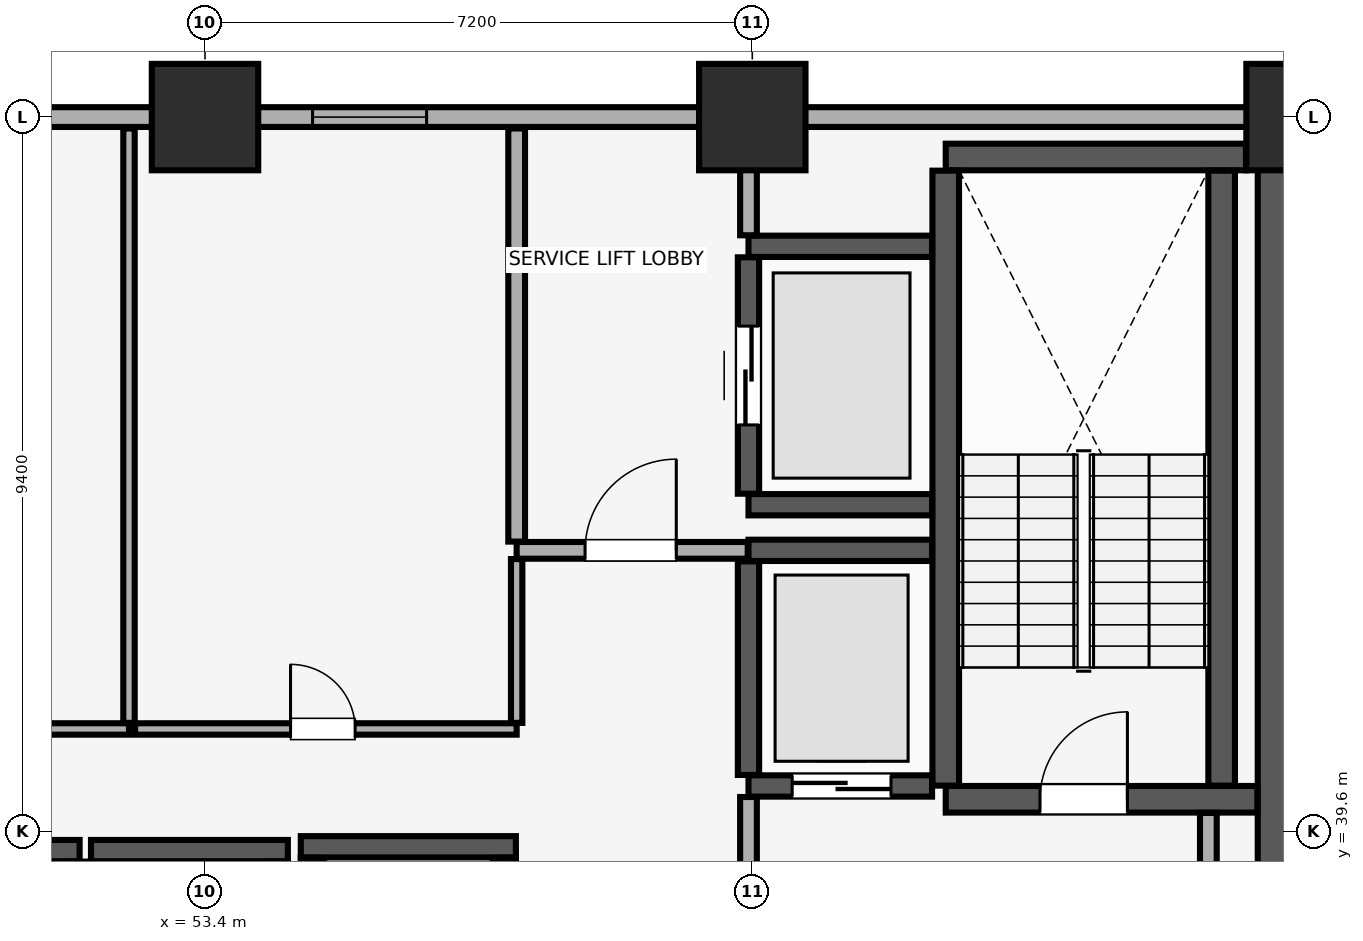
"""IFC4 building model, lengths in metres.
Left out: names, types, materials, properties, quantities, classifications, styles, units other than length and angle.
Written with IfcOpenShell. Run it as: python <this file> out.ifc"""

import sys

from ifc_helpers import new_model, si_unit, direction, frame, frame_2d, origin, origin_2d, place, context, subcontext, project, spatial, rectangle, extrude, element, fill, save


model = new_model("IFC4")
c1 = context("Model", 3, precision=1e-05, world=origin(), true_north=direction((0.0, 1.0)))
c2 = subcontext(c1, "Body", "Model", "MODEL_VIEW")
j1 = project(units=[si_unit("LENGTHUNIT", "METRE"), si_unit("PLANEANGLEUNIT", "RADIAN")], contexts=[c1])
p1 = place(None, origin())
s1 = spatial("IfcSite", under=j1, at=p1, CompositionType="ELEMENT")
p2 = place(p1, origin())
s2 = spatial("IfcBuilding", under=s1, at=p2, CompositionType="ELEMENT")
p3 = place(p2, frame((0.0, 0.0, 35.15)))
s3 = spatial("IfcBuildingStorey", under=s2, at=p3, CompositionType="ELEMENT", Elevation=35.15)
for number, where, z_axis, x_axis in (
    (1, (53.4, 49.0, 0.0), (0.0, 0.0, 1.0), (1.0, 0.0, 0.0)),
    (2, (60.6, 49.0, 0.0), (0.0, 0.0, 1.0), (1.0, 0.0, 0.0)),
    (3, (67.8, 49.0, 0.0), (0.0, 0.0, 1.0), (1.0, 0.0, 0.0)),
):
    element("IfcColumn", number, at=place(p3, frame(where, z_axis=z_axis, x_axis=x_axis)), inside=s3, PredefinedType="COLUMN", context=c2, shape_type="SweptSolid", body=[
        extrude(rectangle(XDim=1.4, YDim=1.4, at=origin_2d()), origin(), (0.0, 0.0, 1.0), 3.51),
    ])
p4 = place(p3, frame((79.8, 49.0, 0.0), z_axis=(0.0, 0.0, 1.0), x_axis=(-1.0, 0.0, 0.0)))
e4 = element("IfcWall", 4, at=p4, inside=s3, PredefinedType="SOLIDWALL", context=c2, shape_type="SweptSolid", body=[
    extrude(rectangle(XDim=75.6, YDim=0.26, at=frame_2d((37.8, 0.0))), origin(), (0.0, 0.0, 1.0), 2.56),
])
p5 = place(p4, frame((72.565, 0.0, 0.85)))
e5 = element("IfcOpeningElement", 5, at=p5, cuts=e4, PredefinedType="OPENING", context=c2, shape_type="SweptSolid", body=[
    extrude(rectangle(XDim=1.5, YDim=1.4, at=frame_2d((0.75, 0.7))), frame((0.0, 0.14, 0.0), z_axis=(0.0, -1.0, 0.0), x_axis=(1.0, 0.0, 0.0)), (0.0, 0.0, 1.0), 0.28),
])
p6 = place(p4, frame((67.45, 0.0, 0.85)))
e6 = element("IfcOpeningElement", 6, at=p6, cuts=e4, PredefinedType="OPENING", context=c2, shape_type="SweptSolid", body=[
    extrude(rectangle(XDim=1.5, YDim=1.4, at=frame_2d((0.75, 0.7))), frame((0.0, 0.14, 0.0), z_axis=(0.0, -1.0, 0.0), x_axis=(1.0, 0.0, 0.0)), (0.0, 0.0, 1.0), 0.28),
])
p7 = place(p4, frame((6.65, 0.0, 0.85)))
e7 = element("IfcOpeningElement", 7, at=p7, cuts=e4, PredefinedType="OPENING", context=c2, shape_type="SweptSolid", body=[
    extrude(rectangle(XDim=1.5, YDim=1.4, at=frame_2d((0.75, 0.7))), frame((0.0, 0.14, 0.0), z_axis=(0.0, -1.0, 0.0), x_axis=(1.0, 0.0, 0.0)), (0.0, 0.0, 1.0), 0.28),
])
p8 = place(p4, frame((1.535, 0.0, 0.85)))
e8 = element("IfcOpeningElement", 8, at=p8, cuts=e4, PredefinedType="OPENING", context=c2, shape_type="SweptSolid", body=[
    extrude(rectangle(XDim=1.5, YDim=1.4, at=frame_2d((0.75, 0.7))), frame((0.0, 0.14, 0.0), z_axis=(0.0, -1.0, 0.0), x_axis=(1.0, 0.0, 0.0)), (0.0, 0.0, 1.0), 0.28),
])
p9 = place(p4, frame((51.365, 0.0, 0.9)))
e9 = element("IfcOpeningElement", 9, at=p9, cuts=e4, PredefinedType="OPENING", context=c2, shape_type="SweptSolid", body=[
    extrude(rectangle(XDim=1.5, YDim=1.4, at=frame_2d((0.75, 0.7))), frame((0.0, 0.14, 0.0), z_axis=(0.0, -1.0, 0.0), x_axis=(1.0, 0.0, 0.0)), (0.0, 0.0, 1.0), 0.28),
])
p10 = place(p4, frame((46.0, 0.0, 0.9)))
e10 = element("IfcOpeningElement", 10, at=p10, cuts=e4, PredefinedType="OPENING", context=c2, shape_type="SweptSolid", body=[
    extrude(rectangle(XDim=1.5, YDim=1.4, at=frame_2d((0.75, 0.7))), frame((0.0, 0.14, 0.0), z_axis=(0.0, -1.0, 0.0), x_axis=(1.0, 0.0, 0.0)), (0.0, 0.0, 1.0), 0.28),
])
p11 = place(p4, frame((29.15, 0.0, 0.9)))
e11 = element("IfcOpeningElement", 11, at=p11, cuts=e4, PredefinedType="OPENING", context=c2, shape_type="SweptSolid", body=[
    extrude(rectangle(XDim=1.5, YDim=1.4, at=frame_2d((0.75, 0.7))), frame((0.0, 0.14, 0.0), z_axis=(0.0, -1.0, 0.0), x_axis=(1.0, 0.0, 0.0)), (0.0, 0.0, 1.0), 0.28),
])
p12 = place(p4, frame((23.485, 0.0, 0.9)))
e12 = element("IfcOpeningElement", 12, at=p12, cuts=e4, PredefinedType="OPENING", context=c2, shape_type="SweptSolid", body=[
    extrude(rectangle(XDim=1.5, YDim=1.4, at=frame_2d((0.75, 0.7))), frame((0.0, 0.14, 0.0), z_axis=(0.0, -1.0, 0.0), x_axis=(1.0, 0.0, 0.0)), (0.0, 0.0, 1.0), 0.28),
])
p13 = place(p3, frame((67.8, 29.4, 0.0), z_axis=(0.0, 0.0, 1.0), x_axis=(0.0, 1.0, 0.0)))
e13 = element("IfcWall", 13, at=p13, inside=s3, PredefinedType="SHEAR", context=c2, shape_type="SweptSolid", body=[
    extrude(rectangle(XDim=19.2, YDim=1.1, at=frame_2d((9.6, 0.0))), origin(), (0.0, 0.0, 1.0), 3.51),
])
p14 = place(p3, frame((63.145, 40.025, 0.0), z_axis=(0.0, 0.0, 1.0), x_axis=(1.0, 0.0, 0.0)))
e14 = element("IfcWall", 14, at=p14, inside=s3, PredefinedType="SHEAR", context=c2, shape_type="SweptSolid", body=[
    extrude(rectangle(XDim=4.1, YDim=0.35, at=frame_2d((2.05, 0.0))), origin(), (0.0, 0.0, 1.0), 3.51),
])
p15 = place(p14, frame((1.24, 0.0, 0.0)))
e15 = element("IfcOpeningElement", 15, at=p15, cuts=e14, PredefinedType="OPENING", context=c2, shape_type="SweptSolid", body=[
    extrude(rectangle(XDim=1.15, YDim=2.15, at=frame_2d((0.575, 1.075))), frame((0.0, 0.185, 0.0), z_axis=(0.0, -1.0, 0.0), x_axis=(1.0, 0.0, 0.0)), (0.0, 0.0, 1.0), 0.37),
])
p16 = place(p3, frame((63.145, 48.475, 0.0), z_axis=(0.0, 0.0, 1.0), x_axis=(1.0, 0.0, 0.0)))
e16 = element("IfcWall", 16, at=p16, inside=s3, PredefinedType="SHEAR", context=c2, shape_type="SweptSolid", body=[
    extrude(rectangle(XDim=3.95, YDim=0.35, at=frame_2d((1.975, 0.0))), origin(), (0.0, 0.0, 1.0), 3.51),
])
for number, where, z_axis, x_axis in (
    (17, (63.145, 40.205, 0.0), (0.0, 0.0, 1.0), (0.0, 1.0, 0.0)),
    (18, (66.775, 40.205, 0.0), (0.0, 0.0, 1.0), (0.0, 1.0, 0.0)),
):
    element("IfcWall", number, at=place(p3, frame(where, z_axis=z_axis, x_axis=x_axis)), inside=s3, PredefinedType="SHEAR", context=c2, shape_type="SweptSolid", body=[
        extrude(rectangle(XDim=8.09, YDim=0.35, at=frame_2d((4.045, 0.0))), origin(), (0.0, 0.0, 1.0), 3.51),
    ])
p17 = place(p3, frame((49.3, 39.35, 0.0), z_axis=(0.0, 0.0, 1.0), x_axis=(1.0, 0.0, 0.0)))
e19 = element("IfcWall", 19, at=p17, inside=s3, PredefinedType="SHEAR", context=c2, shape_type="SweptSolid", body=[
    extrude(rectangle(XDim=2.45, YDim=0.28, at=frame_2d((1.225, 0.0))), origin(), (0.0, 0.0, 1.0), 3.51),
])
p18 = place(p3, frame((51.75, 37.145, 0.0), z_axis=(0.0, 0.0, 1.0), x_axis=(0.0, 1.0, 0.0)))
e20 = element("IfcWall", 20, at=p18, inside=s3, PredefinedType="SHEAR", context=c2, shape_type="SweptSolid", body=[
    extrude(rectangle(XDim=2.06, YDim=0.28, at=frame_2d((1.03, 0.0))), origin(), (0.0, 0.0, 1.0), 3.51),
])
p19 = place(p3, frame((51.9, 39.35, 0.0), z_axis=(0.0, 0.0, 1.0), x_axis=(1.0, 0.0, 0.0)))
e21 = element("IfcWall", 21, at=p19, inside=s3, PredefinedType="SHEAR", context=c2, shape_type="SweptSolid", body=[
    extrude(rectangle(XDim=2.59, YDim=0.28, at=frame_2d((1.295, 0.0))), origin(), (0.0, 0.0, 1.0), 3.51),
])
p20 = place(p3, frame((54.35, 37.145, 0.0), z_axis=(0.0, 0.0, 1.0), x_axis=(0.0, 1.0, 0.0)))
e22 = element("IfcWall", 22, at=p20, inside=s3, PredefinedType="SHEAR", context=c2, shape_type="SweptSolid", body=[
    extrude(rectangle(XDim=2.06, YDim=0.28, at=frame_2d((1.03, 0.0))), origin(), (0.0, 0.0, 1.0), 3.51),
])
p21 = place(p3, frame((54.66, 39.4, 0.0), z_axis=(0.0, 0.0, 1.0), x_axis=(1.0, 0.0, 0.0)))
e23 = element("IfcWall", 23, at=p21, inside=s3, PredefinedType="SHEAR", context=c2, shape_type="SweptSolid", body=[
    extrude(rectangle(XDim=2.83, YDim=0.28, at=frame_2d((1.415, 0.0))), origin(), (0.0, 0.0, 1.0), 3.51),
])
for number, where, z_axis, x_axis in (
    (24, (54.8, 37.145, 0.0), (0.0, 0.0, 1.0), (0.0, 1.0, 0.0)),
    (25, (57.35, 37.145, 0.0), (0.0, 0.0, 1.0), (0.0, 1.0, 0.0)),
):
    element("IfcWall", number, at=place(p3, frame(where, z_axis=z_axis, x_axis=x_axis)), inside=s3, PredefinedType="SHEAR", context=c2, shape_type="SweptSolid", body=[
        extrude(rectangle(XDim=2.11, YDim=0.28, at=frame_2d((1.055, 0.0))), origin(), (0.0, 0.0, 1.0), 3.51),
    ])
p22 = place(p3, frame((60.55, 40.2, 0.0), z_axis=(0.0, 0.0, 1.0), x_axis=(1.0, 0.0, 0.0)))
e26 = element("IfcWall", 26, at=p22, inside=s3, PredefinedType="SHEAR", context=c2, shape_type="SweptSolid", body=[
    extrude(rectangle(XDim=2.415, YDim=0.28, at=frame_2d((1.208, 0.0))), origin(), (0.0, 0.0, 1.0), 3.51),
])
p23 = place(p22, frame((0.575, 0.0, 0.0)))
e27 = element("IfcOpeningElement", 27, at=p23, cuts=e26, PredefinedType="OPENING", context=c2, shape_type="SweptSolid", body=[
    extrude(rectangle(XDim=1.3, YDim=2.3, at=frame_2d((0.65, 1.15))), frame((0.0, 0.15, 0.0), z_axis=(0.0, -1.0, 0.0), x_axis=(1.0, 0.0, 0.0)), (0.0, 0.0, 1.0), 0.3),
])
p24 = place(p3, frame((60.55, 43.3, 0.0), z_axis=(0.0, 0.0, 1.0), x_axis=(1.0, 0.0, 0.0)))
e28 = element("IfcWall", 28, at=p24, inside=s3, PredefinedType="SHEAR", context=c2, shape_type="SweptSolid", body=[
    extrude(rectangle(XDim=2.415, YDim=0.28, at=frame_2d((1.208, 0.0))), origin(), (0.0, 0.0, 1.0), 3.51),
])
p25 = place(p3, frame((60.55, 40.345, 0.0), z_axis=(0.0, 0.0, 1.0), x_axis=(0.0, 1.0, 0.0)))
e29 = element("IfcWall", 29, at=p25, inside=s3, PredefinedType="SHEAR", context=c2, shape_type="SweptSolid", body=[
    extrude(rectangle(XDim=2.81, YDim=0.28, at=frame_2d((1.405, 0.0))), origin(), (0.0, 0.0, 1.0), 3.51),
])
for number, where, z_axis, x_axis in (
    (30, (60.55, 43.9, 0.0), (0.0, 0.0, 1.0), (1.0, 0.0, 0.0)),
    (31, (60.55, 47.3, 0.0), (0.0, 0.0, 1.0), (1.0, 0.0, 0.0)),
):
    element("IfcWall", number, at=place(p3, frame(where, z_axis=z_axis, x_axis=x_axis)), inside=s3, PredefinedType="SHEAR", context=c2, shape_type="SweptSolid", body=[
        extrude(rectangle(XDim=2.415, YDim=0.28, at=frame_2d((1.208, 0.0))), origin(), (0.0, 0.0, 1.0), 3.51),
    ])
p26 = place(p3, frame((60.55, 44.045, 0.0), z_axis=(0.0, 0.0, 1.0), x_axis=(0.0, 1.0, 0.0)))
e32 = element("IfcWall", 32, at=p26, inside=s3, PredefinedType="SHEAR", context=c2, shape_type="SweptSolid", body=[
    extrude(rectangle(XDim=3.11, YDim=0.28, at=frame_2d((1.555, 0.0))), origin(), (0.0, 0.0, 1.0), 3.51),
])
p27 = place(p26, frame((0.905, 0.0, 0.0)))
e33 = element("IfcOpeningElement", 33, at=p27, cuts=e32, PredefinedType="OPENING", context=c2, shape_type="SweptSolid", body=[
    extrude(rectangle(XDim=1.3, YDim=2.3, at=frame_2d((0.65, 1.15))), frame((0.0, 0.15, 0.0), z_axis=(0.0, -1.0, 0.0), x_axis=(1.0, 0.0, 0.0)), (0.0, 0.0, 1.0), 0.3),
])
p28 = place(p3, frame((60.55, 34.415, 0.0), z_axis=(0.0, 0.0, 1.0), x_axis=(0.0, 1.0, 0.0)))
e34 = element("IfcWall", 34, at=p28, inside=s3, PredefinedType="PARTITIONING", context=c2, shape_type="SweptSolid", body=[
    extrude(rectangle(XDim=5.64, YDim=0.22, at=frame_2d((2.82, 0.0))), origin(), (0.0, 0.0, 1.0), 3.51),
])
p29 = place(p3, frame((66.6, 34.415, 0.0), z_axis=(0.0, 0.0, 1.0), x_axis=(0.0, 1.0, 0.0)))
e35 = element("IfcWall", 35, at=p29, inside=s3, PredefinedType="PARTITIONING", context=c2, shape_type="SweptSolid", body=[
    extrude(rectangle(XDim=5.43, YDim=0.22, at=frame_2d((2.715, 0.0))), origin(), (0.0, 0.0, 1.0), 3.51),
])
p30 = place(p3, frame((57.5, 43.3, 0.0), z_axis=(0.0, 0.0, 1.0), x_axis=(1.0, 0.0, 0.0)))
e36 = element("IfcWall", 36, at=p30, inside=s3, PredefinedType="PARTITIONING", context=c2, shape_type="SweptSolid", body=[
    extrude(rectangle(XDim=3.04, YDim=0.22, at=frame_2d((1.52, 0.0))), origin(), (0.0, 0.0, 1.0), 3.51),
])
p31 = place(p30, frame((0.9, 0.0, 0.0)))
e37 = element("IfcOpeningElement", 37, at=p31, cuts=e36, PredefinedType="OPENING", context=c2, shape_type="SweptSolid", body=[
    extrude(rectangle(XDim=1.2, YDim=2.15, at=frame_2d((0.6, 1.075))), frame((0.0, 0.12, 0.0), z_axis=(0.0, -1.0, 0.0), x_axis=(1.0, 0.0, 0.0)), (0.0, 0.0, 1.0), 0.24),
])
p32 = place(p3, frame((57.5, 43.415, 0.0), z_axis=(0.0, 0.0, 1.0), x_axis=(0.0, 1.0, 0.0)))
e38 = element("IfcWall", 38, at=p32, inside=s3, PredefinedType="PARTITIONING", context=c2, shape_type="SweptSolid", body=[
    extrude(rectangle(XDim=5.435, YDim=0.22, at=frame_2d((2.718, 0.0))), origin(), (0.0, 0.0, 1.0), 3.51),
])
p33 = place(p3, frame((60.55, 47.445, 0.0), z_axis=(0.0, 0.0, 1.0), x_axis=(0.0, 1.0, 0.0)))
e39 = element("IfcWall", 39, at=p33, inside=s3, PredefinedType="PARTITIONING", context=c2, shape_type="SweptSolid", body=[
    extrude(rectangle(XDim=1.405, YDim=0.22, at=frame_2d((0.703, 0.0))), origin(), (0.0, 0.0, 1.0), 3.51),
])
p34 = place(p3, frame((47.468, 40.95, 0.0), z_axis=(0.0, 0.0, 1.0), x_axis=(1.0, 0.0, 0.0)))
e40 = element("IfcWall", 40, at=p34, inside=s3, PredefinedType="PARTITIONING", context=c2, shape_type="SweptSolid", body=[
    extrude(rectangle(XDim=4.932, YDim=0.15, at=frame_2d((2.466, 0.0))), origin(), (0.0, 0.0, 1.0), 3.51),
])
p35 = place(p34, frame((2.008, 0.0, 0.0)))
e41 = element("IfcOpeningElement", 41, at=p35, cuts=e40, PredefinedType="OPENING", context=c2, shape_type="SweptSolid", body=[
    extrude(rectangle(XDim=0.85, YDim=2.1, at=frame_2d((0.425, 1.05))), frame((0.0, 0.085, 0.0), z_axis=(0.0, -1.0, 0.0), x_axis=(1.0, 0.0, 0.0)), (0.0, 0.0, 1.0), 0.17),
])
p36 = place(p3, frame((52.4, 41.03, 0.0), z_axis=(0.0, 0.0, 1.0), x_axis=(0.0, 1.0, 0.0)))
e42 = element("IfcWall", 42, at=p36, inside=s3, PredefinedType="PARTITIONING", context=c2, shape_type="SweptSolid", body=[
    extrude(rectangle(XDim=7.82, YDim=0.15, at=frame_2d((3.91, 0.0))), origin(), (0.0, 0.0, 1.0), 3.51),
])
p37 = place(p3, frame((52.48, 40.95, 0.0), z_axis=(0.0, 0.0, 1.0), x_axis=(1.0, 0.0, 0.0)))
e43 = element("IfcWall", 43, at=p37, inside=s3, PredefinedType="PARTITIONING", context=c2, shape_type="SweptSolid", body=[
    extrude(rectangle(XDim=5.02, YDim=0.15, at=frame_2d((2.51, 0.0))), origin(), (0.0, 0.0, 1.0), 3.51),
])
p38 = place(p37, frame((2.045, 0.0, 0.0)))
e44 = element("IfcOpeningElement", 44, at=p38, cuts=e43, PredefinedType="OPENING", context=c2, shape_type="SweptSolid", body=[
    extrude(rectangle(XDim=0.85, YDim=2.1, at=frame_2d((0.425, 1.05))), frame((0.0, 0.085, 0.0), z_axis=(0.0, -1.0, 0.0), x_axis=(1.0, 0.0, 0.0)), (0.0, 0.0, 1.0), 0.17),
])
p39 = place(p3, frame((57.5, 41.03, 0.0), z_axis=(0.0, 0.0, 1.0), x_axis=(0.0, 1.0, 0.0)))
e45 = element("IfcWall", 45, at=p39, inside=s3, PredefinedType="PARTITIONING", context=c2, shape_type="SweptSolid", body=[
    extrude(rectangle(XDim=2.155, YDim=0.15, at=frame_2d((1.078, 0.0))), origin(), (0.0, 0.0, 1.0), 3.51),
])
p40 = place(p12, origin())
e46 = element("IfcWindow", 46, at=p40, inside=s3, PartitioningType="SINGLE_PANEL", PredefinedType="WINDOW", context=c2, shape_type="SweptSolid", body=[
    extrude(rectangle(XDim=1.5, YDim=1.4, at=frame_2d((0.75, 0.7))), frame((0.0, 0.03, 0.0), z_axis=(0.0, -1.0, 0.0), x_axis=(1.0, 0.0, 0.0)), (0.0, 0.0, 1.0), 0.06),
])
fill(e12, e46)
p41 = place(p15, origin())
e47 = element("IfcDoor", 47, at=p41, inside=s3, OperationType="SINGLE_SWING_RIGHT", PredefinedType="DOOR", context=c2, shape_type="SweptSolid", body=[
    extrude(rectangle(XDim=1.15, YDim=2.15, at=frame_2d((0.575, 1.075))), frame((0.0, 0.025, 0.0), z_axis=(0.0, -1.0, 0.0), x_axis=(1.0, 0.0, 0.0)), (0.0, 0.0, 1.0), 0.05),
])
fill(e15, e47)
p42 = place(p23, origin())
e48 = element("IfcDoor", 48, at=p42, inside=s3, OperationType="DOUBLE_DOOR_SLIDING", PredefinedType="DOOR", context=c2, shape_type="SweptSolid", body=[
    extrude(rectangle(XDim=1.3, YDim=2.3, at=frame_2d((0.65, 1.15))), frame((0.0, 0.025, 0.0), z_axis=(0.0, -1.0, 0.0), x_axis=(1.0, 0.0, 0.0)), (0.0, 0.0, 1.0), 0.05),
])
fill(e27, e48)
p43 = place(p27, origin())
e49 = element("IfcDoor", 49, at=p43, inside=s3, OperationType="DOUBLE_DOOR_SLIDING", PredefinedType="DOOR", context=c2, shape_type="SweptSolid", body=[
    extrude(rectangle(XDim=1.3, YDim=2.3, at=frame_2d((0.65, 1.15))), frame((0.0, 0.025, 0.0), z_axis=(0.0, -1.0, 0.0), x_axis=(1.0, 0.0, 0.0)), (0.0, 0.0, 1.0), 0.05),
])
fill(e33, e49)
p44 = place(p31, origin())
e50 = element("IfcDoor", 50, at=p44, inside=s3, OperationType="SINGLE_SWING_RIGHT", PredefinedType="DOOR", context=c2, shape_type="SweptSolid", body=[
    extrude(rectangle(XDim=1.2, YDim=2.15, at=frame_2d((0.6, 1.075))), frame((0.0, 0.025, 0.0), z_axis=(0.0, -1.0, 0.0), x_axis=(1.0, 0.0, 0.0)), (0.0, 0.0, 1.0), 0.05),
])
fill(e37, e50)
p45 = place(p38, origin())
e51 = element("IfcDoor", 51, at=p45, inside=s3, OperationType="SINGLE_SWING_LEFT", PredefinedType="DOOR", context=c2, shape_type="SweptSolid", body=[
    extrude(rectangle(XDim=0.85, YDim=2.1, at=frame_2d((0.425, 1.05))), frame((0.0, 0.025, 0.0), z_axis=(0.0, -1.0, 0.0), x_axis=(1.0, 0.0, 0.0)), (0.0, 0.0, 1.0), 0.05),
])
fill(e44, e51)
save(model, sys.argv[1])
